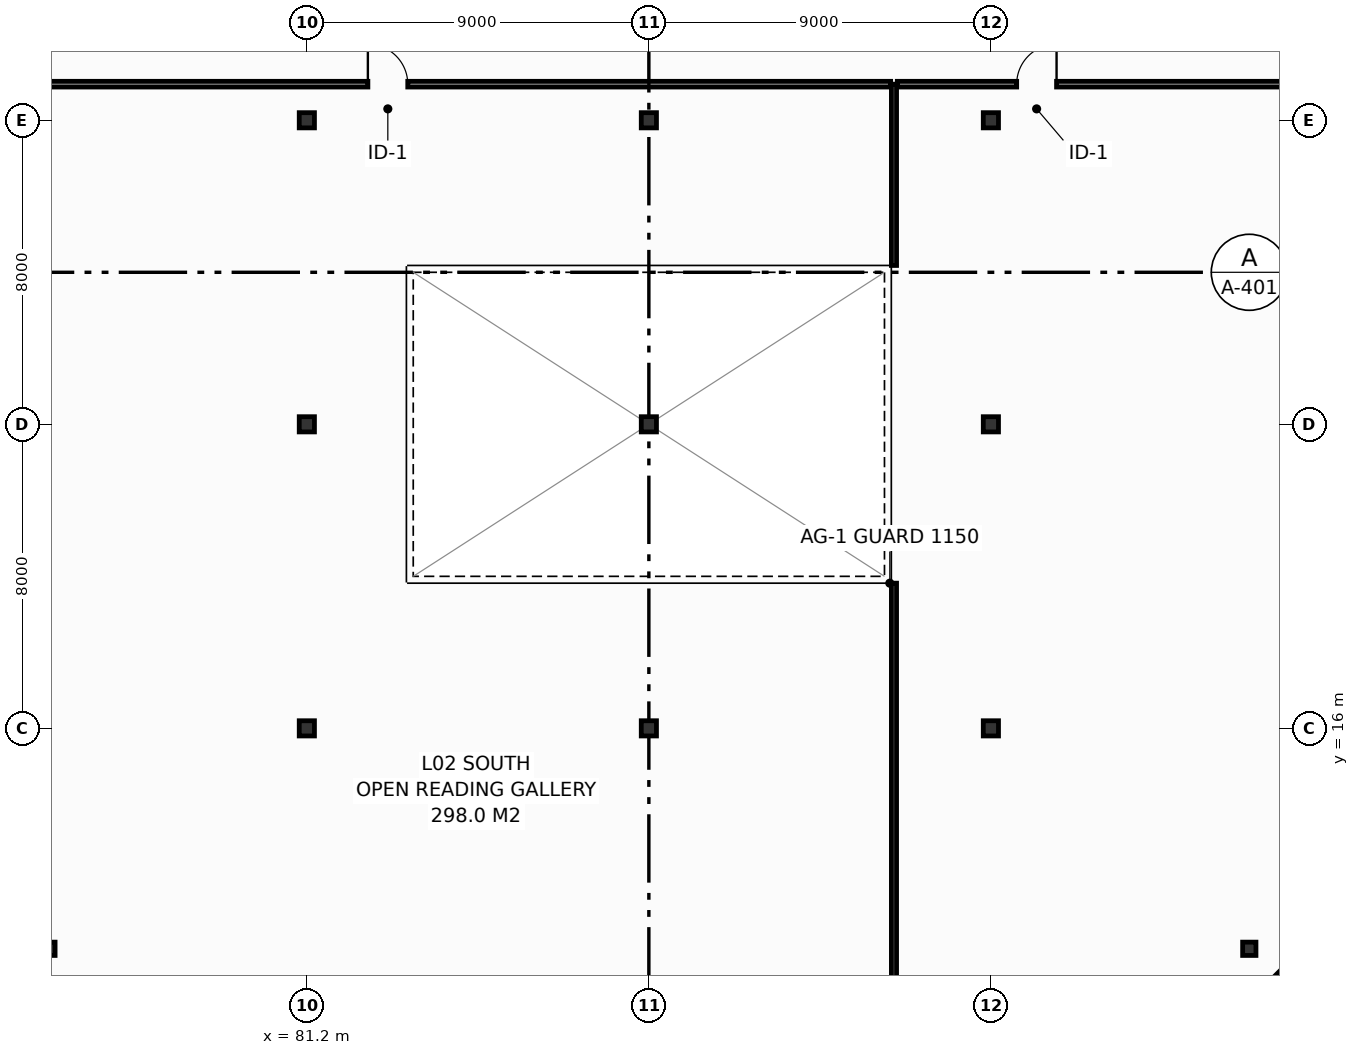
"""IFC4 building model, lengths in metres.
Left out: names, types, materials, properties, quantities, classifications, styles, units other than length and angle.
Written with IfcOpenShell. Run it as: python <this file> out.ifc"""

import sys

from ifc_helpers import new_model, si_unit, direction, frame, frame_2d, origin, origin_2d, place, context, subcontext, project, spatial, rectangle, i_section, extrude, element, fill, save


model = new_model("IFC4")
c1 = context("Model", 3, precision=1e-05, world=origin(), true_north=direction((0.0, 1.0)))
c2 = subcontext(c1, "Body", "Model", "MODEL_VIEW")
j1 = project(units=[si_unit("LENGTHUNIT", "METRE"), si_unit("PLANEANGLEUNIT", "RADIAN")], contexts=[c1])
p1 = place(None, origin())
s1 = spatial("IfcSite", under=j1, at=p1, CompositionType="ELEMENT")
p2 = place(p1, origin())
s2 = spatial("IfcBuilding", under=s1, at=p2, CompositionType="ELEMENT")
p3 = place(p2, frame((0.0, 0.0, 11.4)))
s3 = spatial("IfcBuildingStorey", under=s2, at=p3, CompositionType="ELEMENT", Elevation=11.4)
p4 = place(p3, frame((74.4, 10.2, 0.0), z_axis=(0.0, 0.0, 1.0), x_axis=(1.0, 0.0, 0.0)))
e1 = element("IfcColumn", 1, at=p4, inside=s3, PredefinedType="COLUMN", context=c2, shape_type="SweptSolid", body=[
    extrude(i_section(OverallWidth=0.35, OverallDepth=0.35, WebThickness=0.012, FlangeThickness=0.019, FilletRadius=0.02, at=origin_2d()), origin(), (0.0, 0.0, 1.0), 5.4),
])
for number, where, z_axis, x_axis in (
    (2, (81.2, 16.0, 0.0), (0.0, 0.0, 1.0), (1.0, 0.0, 0.0)),
    (3, (81.2, 24.0, 0.0), (0.0, 0.0, 1.0), (1.0, 0.0, 0.0)),
    (4, (81.2, 32.0, 0.0), (0.0, 0.0, 1.0), (1.0, 0.0, 0.0)),
    (5, (90.2, 16.0, 0.0), (0.0, 0.0, 1.0), (1.0, 0.0, 0.0)),
    (6, (90.2, 24.0, 0.0), (0.0, 0.0, 1.0), (1.0, 0.0, 0.0)),
    (7, (90.2, 32.0, 0.0), (0.0, 0.0, 1.0), (1.0, 0.0, 0.0)),
    (8, (99.2, 16.0, 0.0), (0.0, 0.0, 1.0), (1.0, 0.0, 0.0)),
    (9, (99.2, 24.0, 0.0), (0.0, 0.0, 1.0), (1.0, 0.0, 0.0)),
    (10, (99.2, 32.0, 0.0), (0.0, 0.0, 1.0), (1.0, 0.0, 0.0)),
):
    element("IfcColumn", number, at=place(p3, frame(where, z_axis=z_axis, x_axis=x_axis)), inside=s3, PredefinedType="COLUMN", context=c2, shape_type="SweptSolid", body=[
        extrude(i_section(OverallWidth=0.4, OverallDepth=0.4, WebThickness=0.013, FlangeThickness=0.021, FilletRadius=0.022, at=origin_2d()), origin(), (0.0, 0.0, 1.0), 5.4),
    ])
p5 = place(p3, frame((106.0, 10.2, 0.0), z_axis=(0.0, 0.0, 1.0), x_axis=(1.0, 0.0, 0.0)))
e11 = element("IfcColumn", 11, at=p5, inside=s3, PredefinedType="COLUMN", context=c2, shape_type="SweptSolid", body=[
    extrude(i_section(OverallWidth=0.35, OverallDepth=0.35, WebThickness=0.012, FlangeThickness=0.019, FilletRadius=0.02, at=origin_2d()), origin(), (0.0, 0.0, 1.0), 5.4),
])
p6 = place(p3, frame((72.313, 10.687, 0.0), z_axis=(0.0, 0.0, 1.0), x_axis=(0.707106781187, -0.707106781187, 0.0)))
e12 = element("IfcWall", 12, at=p6, inside=s3, PredefinedType="STANDARD", context=c2, shape_type="SweptSolid", body=[
    extrude(rectangle(XDim=3.64, YDim=0.3, at=frame_2d((1.82, 0.0))), origin(), (0.0, 0.0, 1.0), 5.1),
])
p7 = place(p3, frame((105.513, 8.113, 0.0), z_axis=(0.0, 0.0, 1.0), x_axis=(0.707073244381, 0.707140316402, 0.0)))
e13 = element("IfcWall", 13, at=p7, inside=s3, PredefinedType="STANDARD", context=c2, shape_type="SweptSolid", body=[
    extrude(rectangle(XDim=3.64, YDim=0.3, at=frame_2d((1.82, 0.0))), origin(), (0.0, 0.0, 1.0), 5.1),
])
p8 = place(p3, frame((96.65, 8.17, 0.0), z_axis=(0.0, 0.0, 1.0), x_axis=(0.0, 1.0, 0.0)))
e14 = element("IfcWall", 14, at=p8, inside=s3, PredefinedType="PARTITIONING", context=c2, shape_type="SweptSolid", body=[
    extrude(rectangle(XDim=11.65, YDim=0.135, at=frame_2d((5.825, 0.0))), origin(), (0.0, 0.0, 1.0), 4.385),
])
p9 = place(p3, frame((96.65, 28.18, 0.0), z_axis=(0.0, 0.0, 1.0), x_axis=(0.0, 1.0, 0.0)))
e15 = element("IfcWall", 15, at=p9, inside=s3, PredefinedType="PARTITIONING", context=c2, shape_type="SweptSolid", body=[
    extrude(rectangle(XDim=4.77, YDim=0.135, at=frame_2d((2.385, 0.0))), origin(), (0.0, 0.0, 1.0), 4.385),
])
p10 = place(p3, frame((72.3, 32.95, 0.0), z_axis=(0.0, 0.0, 1.0), x_axis=(1.0, 0.0, 0.0)))
e16 = element("IfcWall", 16, at=p10, inside=s3, PredefinedType="PARTITIONING", context=c2, shape_type="SweptSolid", body=[
    extrude(rectangle(XDim=24.262, YDim=0.15, at=frame_2d((12.131, 0.0))), origin(), (0.0, 0.0, 1.0), 4.385),
])
p11 = place(p10, frame((10.506, 0.0, 0.0)))
e17 = element("IfcOpeningElement", 17, at=p11, cuts=e16, PredefinedType="OPENING", context=c2, shape_type="SweptSolid", body=[
    extrude(rectangle(XDim=1.05, YDim=2.15, at=frame_2d((0.525, 1.075))), frame((0.0, 0.085, 0.0), z_axis=(0.0, -1.0, 0.0), x_axis=(1.0, 0.0, 0.0)), (0.0, 0.0, 1.0), 0.17),
])
p12 = place(p3, frame((96.738, 32.95, 0.0), z_axis=(0.0, 0.0, 1.0), x_axis=(1.0, 0.0, 0.0)))
e18 = element("IfcWall", 18, at=p12, inside=s3, PredefinedType="PARTITIONING", context=c2, shape_type="SweptSolid", body=[
    extrude(rectangle(XDim=11.292, YDim=0.15, at=frame_2d((5.646, 0.0))), origin(), (0.0, 0.0, 1.0), 4.385),
])
p13 = place(p12, frame((3.141, 0.0, 0.0)))
e19 = element("IfcOpeningElement", 19, at=p13, cuts=e18, PredefinedType="OPENING", context=c2, shape_type="SweptSolid", body=[
    extrude(rectangle(XDim=1.05, YDim=2.15, at=frame_2d((0.525, 1.075))), frame((0.0, 0.085, 0.0), z_axis=(0.0, -1.0, 0.0), x_axis=(1.0, 0.0, 0.0)), (0.0, 0.0, 1.0), 0.17),
])
p14 = place(p11, origin())
e20 = element("IfcDoor", 20, at=p14, inside=s3, OperationType="SINGLE_SWING_LEFT", PredefinedType="DOOR", context=c2, shape_type="SweptSolid", body=[
    extrude(rectangle(XDim=1.05, YDim=2.15, at=frame_2d((0.525, 1.075))), frame((0.0, 0.025, 0.0), z_axis=(0.0, -1.0, 0.0), x_axis=(1.0, 0.0, 0.0)), (0.0, 0.0, 1.0), 0.05),
])
fill(e17, e20)
p15 = place(p13, origin())
e21 = element("IfcDoor", 21, at=p15, inside=s3, OperationType="SINGLE_SWING_RIGHT", PredefinedType="DOOR", context=c2, shape_type="SweptSolid", body=[
    extrude(rectangle(XDim=1.05, YDim=2.15, at=frame_2d((0.525, 1.075))), frame((0.0, 0.025, 0.0), z_axis=(0.0, -1.0, 0.0), x_axis=(1.0, 0.0, 0.0)), (0.0, 0.0, 1.0), 0.05),
])
fill(e19, e21)
save(model, sys.argv[1])
